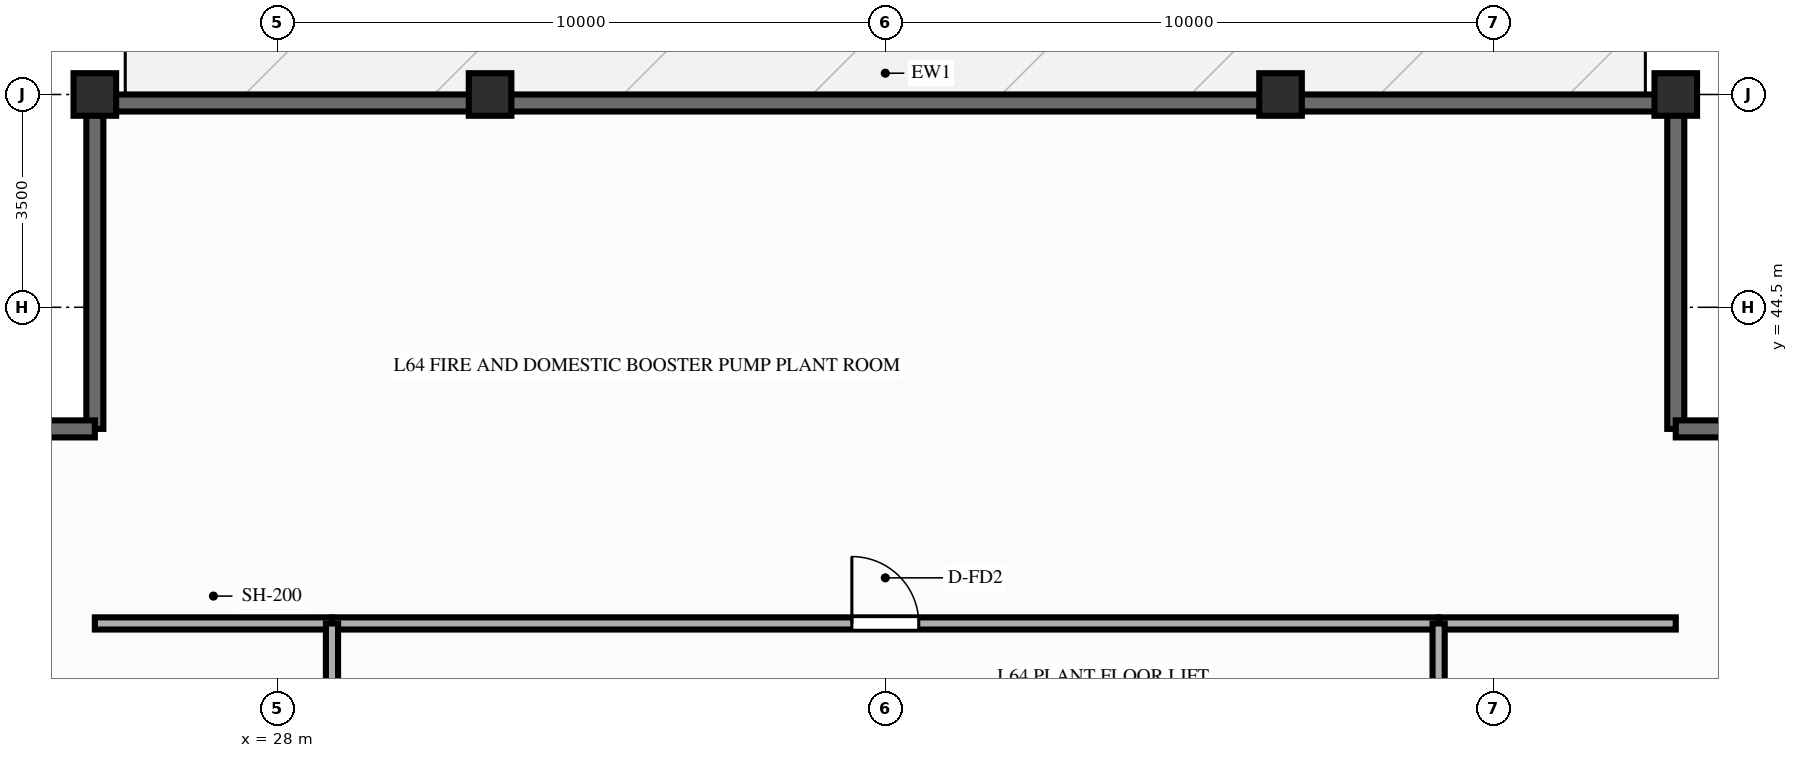
"""IFC4 building model, lengths in metres.
Left out: names, types, materials, properties, quantities, classifications, styles, units other than length and angle.
Written with IfcOpenShell. Run it as: python <this file> out.ifc"""

import sys

from ifc_helpers import new_model, si_unit, direction, frame, frame_2d, origin, origin_2d, place, context, subcontext, project, spatial, rectangle, extrude, source, transform, mapped, element, fill, save


model = new_model("IFC4")
c1 = context("Model", 3, precision=1e-05, world=origin(), true_north=direction((0.0, 1.0)))
c2 = subcontext(c1, "Body", "Model", "MODEL_VIEW")
j1 = project(units=[si_unit("LENGTHUNIT", "METRE"), si_unit("PLANEANGLEUNIT", "RADIAN")], contexts=[c1])
p1 = place(None, origin())
s1 = spatial("IfcSite", under=j1, at=p1, CompositionType="ELEMENT")
p2 = place(p1, origin())
s2 = spatial("IfcBuilding", under=s1, at=p2, CompositionType="ELEMENT")
p3 = place(p2, frame((0.0, 0.0, 206.5)))
s3 = spatial("IfcBuildingStorey", under=s2, at=p3, CompositionType="ELEMENT", Elevation=206.5)
m1 = source(origin(), c2, "Body", "SweptSolid", [
    extrude(rectangle(XDim=0.7, YDim=0.7, at=origin_2d()), origin(), (0.0, 0.0, 1.0), 3.8),
])
for number, where, z_axis, x_axis in (
    (1, (51.0, 48.0, 0.0), (0.0, 0.0, 1.0), (1.0, 0.0, 0.0)),
    (2, (44.5, 48.0, 0.0), (0.0, 0.0, 1.0), (1.0, 0.0, 0.0)),
    (3, (31.5, 48.0, 0.0), (0.0, 0.0, 1.0), (1.0, 0.0, 0.0)),
    (4, (25.0, 48.0, 0.0), (0.0, 0.0, 1.0), (1.0, 0.0, 0.0)),
):
    element("IfcColumn", number, at=place(p3, frame(where, z_axis=z_axis, x_axis=x_axis)), inside=s3, PredefinedType="COLUMN", context=c2, shape_type="MappedRepresentation", body=[
        mapped(m1, transform((0.0, 0.0, 0.0), scale=1.0)),
    ])
p4 = place(p3, frame((25.0, 47.86, 0.0), z_axis=(0.0, 0.0, 1.0), x_axis=(1.0, 0.0, 0.0)))
e5 = element("IfcWall", 5, at=p4, inside=s3, PredefinedType="SOLIDWALL", context=c2, shape_type="SweptSolid", body=[
    extrude(rectangle(XDim=26.0, YDim=0.28, at=frame_2d((13.0, 0.0))), origin(), (0.0, 0.0, 1.0), 2.34),
])
for number, where, z_axis, x_axis in (
    (6, (25.0, 42.5, 0.0), (0.0, 0.0, 1.0), (0.0, 1.0, 0.0)),
    (7, (19.5, 42.5, 0.0), (0.0, 0.0, 1.0), (1.0, 0.0, 0.0)),
    (8, (51.0, 42.5, 0.0), (0.0, 0.0, 1.0), (0.0, 1.0, 0.0)),
    (9, (51.0, 42.5, 0.0), (0.0, 0.0, 1.0), (1.0, 0.0, 0.0)),
):
    element("IfcWall", number, at=place(p3, frame(where, z_axis=z_axis, x_axis=x_axis)), inside=s3, PredefinedType="SOLIDWALL", context=c2, shape_type="SweptSolid", body=[
        extrude(rectangle(XDim=5.5, YDim=0.28, at=frame_2d((2.75, 0.0))), origin(), (0.0, 0.0, 1.0), 2.34),
    ])
p5 = place(p3, frame((25.0, 39.3, 0.0), z_axis=(0.0, 0.0, 1.0), x_axis=(1.0, 0.0, 0.0)))
e10 = element("IfcWall", 10, at=p5, inside=s3, PredefinedType="PARTITIONING", context=c2, shape_type="SweptSolid", body=[
    extrude(rectangle(XDim=3.9, YDim=0.2, at=frame_2d((1.95, 0.0))), origin(), (0.0, 0.0, 1.0), 3.59),
])
p6 = place(p3, frame((28.9, 39.3, 0.0), z_axis=(0.0, 0.0, 1.0), x_axis=(1.0, 0.0, 0.0)))
e11 = element("IfcWall", 11, at=p6, inside=s3, PredefinedType="PARTITIONING", context=c2, shape_type="SweptSolid", body=[
    extrude(rectangle(XDim=18.2, YDim=0.2, at=frame_2d((9.1, 0.0))), origin(), (0.0, 0.0, 1.0), 3.59),
])
p7 = place(p6, frame((8.55, 0.0, 0.0)))
e12 = element("IfcOpeningElement", 12, at=p7, cuts=e11, PredefinedType="OPENING", context=c2, shape_type="SweptSolid", body=[
    extrude(rectangle(XDim=1.1, YDim=2.15, at=frame_2d((0.55, 1.075))), frame((0.0, 0.112, 0.0), z_axis=(0.0, -1.0, 0.0), x_axis=(1.0, 0.0, 0.0)), (0.0, 0.0, 1.0), 0.224),
])
p8 = place(p3, frame((47.1, 39.3, 0.0), z_axis=(0.0, 0.0, 1.0), x_axis=(1.0, 0.0, 0.0)))
e13 = element("IfcWall", 13, at=p8, inside=s3, PredefinedType="PARTITIONING", context=c2, shape_type="SweptSolid", body=[
    extrude(rectangle(XDim=3.9, YDim=0.2, at=frame_2d((1.95, 0.0))), origin(), (0.0, 0.0, 1.0), 3.59),
])
p9 = place(p3, frame((28.9, 14.5, 0.0), z_axis=(0.0, 0.0, 1.0), x_axis=(0.0, 1.0, 0.0)))
e14 = element("IfcWall", 14, at=p9, inside=s3, PredefinedType="PARTITIONING", context=c2, shape_type="SweptSolid", body=[
    extrude(rectangle(XDim=24.8, YDim=0.2, at=frame_2d((12.4, 0.0))), origin(), (0.0, 0.0, 1.0), 3.59),
])
p10 = place(p9, frame((11.85, 0.0, 0.0)))
e15 = element("IfcOpeningElement", 15, at=p10, cuts=e14, PredefinedType="OPENING", context=c2, shape_type="SweptSolid", body=[
    extrude(rectangle(XDim=1.1, YDim=2.15, at=frame_2d((0.55, 1.075))), frame((0.0, 0.112, 0.0), z_axis=(0.0, -1.0, 0.0), x_axis=(1.0, 0.0, 0.0)), (0.0, 0.0, 1.0), 0.224),
])
p11 = place(p3, frame((47.1, 14.5, 0.0), z_axis=(0.0, 0.0, 1.0), x_axis=(0.0, 1.0, 0.0)))
e16 = element("IfcWall", 16, at=p11, inside=s3, PredefinedType="PARTITIONING", context=c2, shape_type="SweptSolid", body=[
    extrude(rectangle(XDim=24.8, YDim=0.2, at=frame_2d((12.4, 0.0))), origin(), (0.0, 0.0, 1.0), 3.59),
])
p12 = place(p11, frame((11.85, 0.0, 0.0)))
e17 = element("IfcOpeningElement", 17, at=p12, cuts=e16, PredefinedType="OPENING", context=c2, shape_type="SweptSolid", body=[
    extrude(rectangle(XDim=1.1, YDim=2.15, at=frame_2d((0.55, 1.075))), frame((0.0, 0.112, 0.0), z_axis=(0.0, -1.0, 0.0), x_axis=(1.0, 0.0, 0.0)), (0.0, 0.0, 1.0), 0.224),
])
m2 = source(origin(), c2, "Body", "SweptSolid", [
    extrude(rectangle(XDim=1.1, YDim=2.15, at=frame_2d((0.55, 1.075))), frame((0.0, 0.025, 0.0), z_axis=(0.0, -1.0, 0.0), x_axis=(1.0, 0.0, 0.0)), (0.0, 0.0, 1.0), 0.05),
])
p13 = place(p7, origin())
e18 = element("IfcDoor", 18, at=p13, inside=s3, OperationType="SINGLE_SWING_LEFT", PredefinedType="DOOR", context=c2, shape_type="MappedRepresentation", body=[
    mapped(m2, transform((0.0, 0.0, 0.0), scale=1.0)),
])
fill(e12, e18)
save(model, sys.argv[1])
